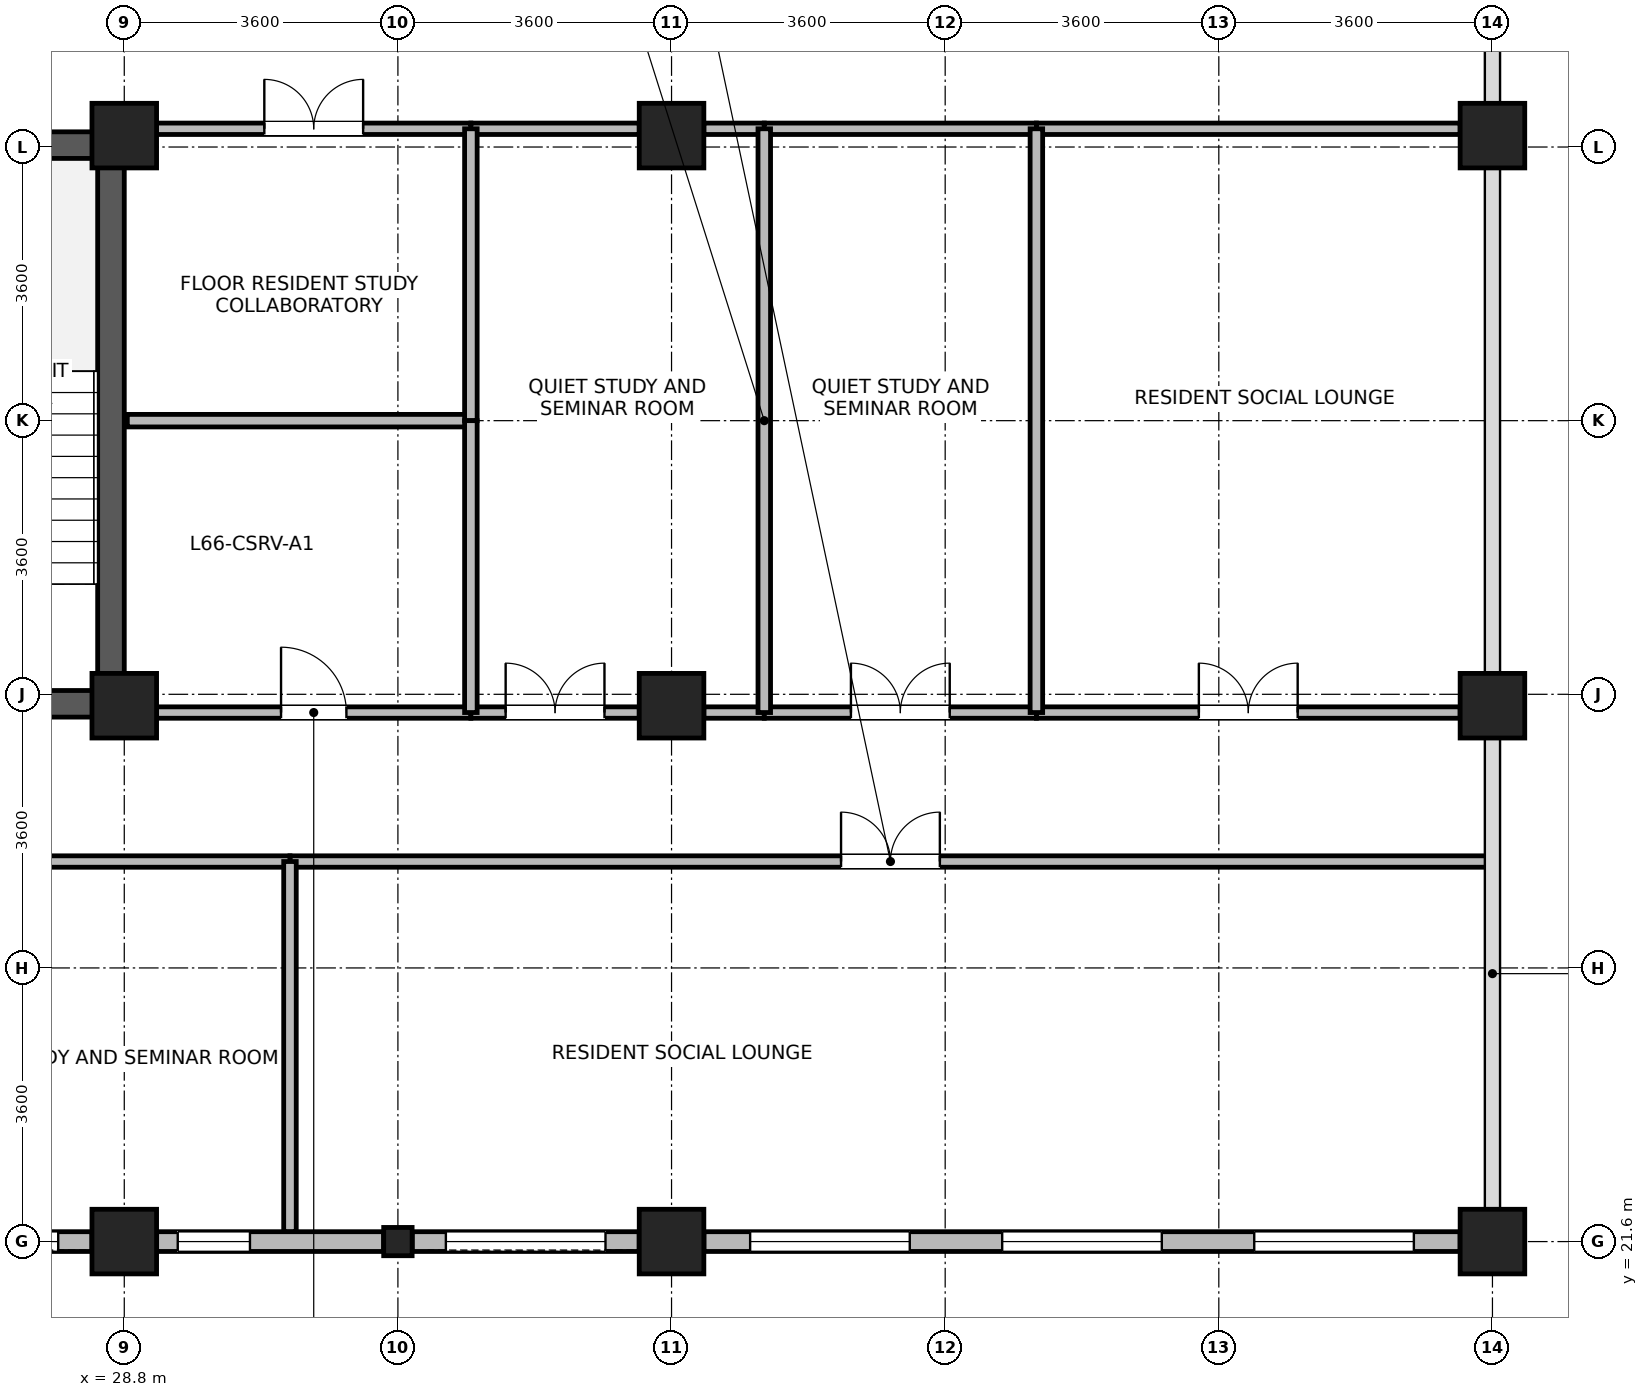
"""IFC4 building model, lengths in metres.
Left out: names, types, materials, properties, quantities, classifications, styles, units other than length and angle.
Written with IfcOpenShell. Run it as: python <this file> out.ifc"""

import sys

from ifc_helpers import new_model, si_unit, direction, frame, frame_2d, origin, origin_2d, place, context, subcontext, project, spatial, rectangle, i_section, extrude, source, transform, mapped, element, fill, save


model = new_model("IFC4")
c1 = context("Model", 3, precision=1e-05, world=origin(), true_north=direction((0.0, 1.0)))
c2 = subcontext(c1, "Body", "Model", "MODEL_VIEW")
j1 = project(units=[si_unit("LENGTHUNIT", "METRE"), si_unit("PLANEANGLEUNIT", "RADIAN")], contexts=[c1])
p1 = place(None, origin())
s1 = spatial("IfcSite", under=j1, at=p1, CompositionType="ELEMENT")
p2 = place(p1, origin())
s2 = spatial("IfcBuilding", under=s1, at=p2, CompositionType="ELEMENT")
p3 = place(p2, frame((0.0, 0.0, 257.3)))
s3 = spatial("IfcBuildingStorey", under=s2, at=p3, CompositionType="ELEMENT", Elevation=257.3)
p4 = place(p3, frame((28.625, 28.5, 0.0), z_axis=(0.0, 0.0, 1.0), x_axis=(0.0, 1.0, 0.0)))
e1 = element("IfcWall", 1, at=p4, inside=s3, PredefinedType="SHEAR", context=c2, shape_type="SweptSolid", body=[
    extrude(rectangle(XDim=7.7, YDim=0.35, at=frame_2d((3.85, 0.0))), origin(), (0.0, 0.0, 1.0), 3.475),
])
for number, where, z_axis, x_axis in (
    (2, (25.25, 28.675, 0.0), (0.0, 0.0, 1.0), (1.0, 0.0, 0.0)),
    (3, (25.25, 36.025, 0.0), (0.0, 0.0, 1.0), (1.0, 0.0, 0.0)),
):
    element("IfcWall", number, at=place(p3, frame(where, z_axis=z_axis, x_axis=x_axis)), inside=s3, PredefinedType="SHEAR", context=c2, shape_type="SweptSolid", body=[
        extrude(rectangle(XDim=3.2, YDim=0.35, at=frame_2d((1.6, 0.0))), origin(), (0.0, 0.0, 1.0), 3.475),
    ])
m1 = source(origin(), c2, "Body", "SweptSolid", [
    extrude(rectangle(XDim=0.85, YDim=0.85, at=origin_2d()), origin(), (0.0, 0.0, 1.0), 3.7),
])
for number, where, z_axis, x_axis in (
    (4, (28.8, 21.6, 0.0), (0.0, 0.0, 1.0), (1.0, 0.0, 0.0)),
    (5, (28.8, 28.65, 0.0), (0.0, 0.0, 1.0), (1.0, 0.0, 0.0)),
    (6, (28.8, 36.15, 0.0), (0.0, 0.0, 1.0), (1.0, 0.0, 0.0)),
    (7, (36.0, 21.6, 0.0), (0.0, 0.0, 1.0), (1.0, 0.0, 0.0)),
    (8, (36.0, 28.65, 0.0), (0.0, 0.0, 1.0), (1.0, 0.0, 0.0)),
    (9, (36.0, 36.15, 0.0), (0.0, 0.0, 1.0), (1.0, 0.0, 0.0)),
    (10, (46.8, 21.6, 0.0), (0.0, 0.0, 1.0), (1.0, 0.0, 0.0)),
    (11, (46.8, 28.65, 0.0), (0.0, 0.0, 1.0), (1.0, 0.0, 0.0)),
    (12, (46.8, 36.15, 0.0), (0.0, 0.0, 1.0), (1.0, 0.0, 0.0)),
):
    element("IfcColumn", number, at=place(p3, frame(where, z_axis=z_axis, x_axis=x_axis)), inside=s3, PredefinedType="COLUMN", context=c2, shape_type="MappedRepresentation", body=[
        mapped(m1, transform((0.0, 0.0, 0.0), x_axis=(1.0, 0.0, 0.0), y_axis=(0.0, 1.0, 0.0), z_axis=(0.0, 0.0, 1.0), scale=1.0)),
    ])
m2 = source(origin(), c2, "Body", "SweptSolid", [
    extrude(i_section(OverallWidth=0.374, OverallDepth=0.372, WebThickness=0.015, FlangeThickness=0.026, FilletRadius=0.015, at=origin_2d()), origin(), (0.0, 0.0, 1.0), 3.7),
])
p5 = place(p3, frame((32.4, 21.6, 0.0), z_axis=(0.0, 0.0, 1.0), x_axis=(1.0, 0.0, 0.0)))
e13 = element("IfcColumn", 13, at=p5, inside=s3, PredefinedType="COLUMN", context=c2, shape_type="MappedRepresentation", body=[
    mapped(m2, transform((0.0, 0.0, 0.0), x_axis=(1.0, 0.0, 0.0), y_axis=(0.0, 1.0, 0.0), z_axis=(0.0, 0.0, 1.0), scale=1.0)),
])
p6 = place(p3, frame((28.374, 21.6, 0.0), z_axis=(0.0, 0.0, 1.0), x_axis=(-1.0, 0.0, 0.0)))
e14 = element("IfcWall", 14, at=p6, inside=s3, PredefinedType="STANDARD", context=c2, shape_type="SweptSolid", body=[
    extrude(rectangle(XDim=2.986, YDim=0.26, at=frame_2d((1.493, 0.0))), origin(), (0.0, 0.0, 1.0), 3.055),
])
p7 = place(p6, frame((0.443, 0.0, 0.85)))
e15 = element("IfcOpeningElement", 15, at=p7, cuts=e14, PredefinedType="OPENING", context=c2, shape_type="SweptSolid", body=[
    extrude(rectangle(XDim=2.1, YDim=1.95, at=frame_2d((1.05, 0.975))), frame((0.0, 0.14, 0.0), z_axis=(0.0, -1.0, 0.0), x_axis=(1.0, 0.0, 0.0)), (0.0, 0.0, 1.0), 0.28),
])
p8 = place(p3, frame((32.212, 21.6, 0.0), z_axis=(0.0, 0.0, 1.0), x_axis=(-1.0, 0.0, 0.0)))
e16 = element("IfcWall", 16, at=p8, inside=s3, PredefinedType="STANDARD", context=c2, shape_type="SweptSolid", body=[
    extrude(rectangle(XDim=2.986, YDim=0.26, at=frame_2d((1.493, 0.0))), origin(), (0.0, 0.0, 1.0), 3.055),
])
p9 = place(p8, frame((1.759, 0.0, 0.85)))
e17 = element("IfcOpeningElement", 17, at=p9, cuts=e16, PredefinedType="OPENING", context=c2, shape_type="SweptSolid", body=[
    extrude(rectangle(XDim=0.95, YDim=1.75, at=frame_2d((0.475, 0.875))), frame((0.0, 0.14, 0.0), z_axis=(0.0, -1.0, 0.0), x_axis=(1.0, 0.0, 0.0)), (0.0, 0.0, 1.0), 0.28),
])
p10 = place(p3, frame((35.574, 21.6, 0.0), z_axis=(0.0, 0.0, 1.0), x_axis=(-1.0, 0.0, 0.0)))
e18 = element("IfcWall", 18, at=p10, inside=s3, PredefinedType="STANDARD", context=c2, shape_type="SweptSolid", body=[
    extrude(rectangle(XDim=2.986, YDim=0.26, at=frame_2d((1.493, 0.0))), origin(), (0.0, 0.0, 1.0), 3.055),
])
p11 = place(p10, frame((0.443, 0.0, 0.85)))
e19 = element("IfcOpeningElement", 19, at=p11, cuts=e18, PredefinedType="OPENING", context=c2, shape_type="SweptSolid", body=[
    extrude(rectangle(XDim=2.1, YDim=1.95, at=frame_2d((1.05, 0.975))), frame((0.0, 0.14, 0.0), z_axis=(0.0, -1.0, 0.0), x_axis=(1.0, 0.0, 0.0)), (0.0, 0.0, 1.0), 0.28),
])
p12 = place(p3, frame((46.374, 21.6, 0.0), z_axis=(0.0, 0.0, 1.0), x_axis=(-1.0, 0.0, 0.0)))
e20 = element("IfcWall", 20, at=p12, inside=s3, PredefinedType="STANDARD", context=c2, shape_type="SweptSolid", body=[
    extrude(rectangle(XDim=9.948, YDim=0.26, at=frame_2d((4.974, 0.0))), origin(), (0.0, 0.0, 1.0), 3.055),
])
p13 = place(p12, frame((0.608, 0.0, 0.85)))
e21 = element("IfcOpeningElement", 21, at=p13, cuts=e20, PredefinedType="OPENING", context=c2, shape_type="SweptSolid", body=[
    extrude(rectangle(XDim=2.1, YDim=1.95, at=frame_2d((1.05, 0.975))), frame((0.0, 0.14, 0.0), z_axis=(0.0, -1.0, 0.0), x_axis=(1.0, 0.0, 0.0)), (0.0, 0.0, 1.0), 0.28),
])
p14 = place(p12, frame((3.924, 0.0, 0.85)))
e22 = element("IfcOpeningElement", 22, at=p14, cuts=e20, PredefinedType="OPENING", context=c2, shape_type="SweptSolid", body=[
    extrude(rectangle(XDim=2.1, YDim=1.95, at=frame_2d((1.05, 0.975))), frame((0.0, 0.14, 0.0), z_axis=(0.0, -1.0, 0.0), x_axis=(1.0, 0.0, 0.0)), (0.0, 0.0, 1.0), 0.28),
])
p15 = place(p12, frame((7.24, 0.0, 0.85)))
e23 = element("IfcOpeningElement", 23, at=p15, cuts=e20, PredefinedType="OPENING", context=c2, shape_type="SweptSolid", body=[
    extrude(rectangle(XDim=2.1, YDim=1.95, at=frame_2d((1.05, 0.975))), frame((0.0, 0.14, 0.0), z_axis=(0.0, -1.0, 0.0), x_axis=(1.0, 0.0, 0.0)), (0.0, 0.0, 1.0), 0.28),
])
p16 = place(p3, frame((30.98, 26.6, 0.0), z_axis=(0.0, 0.0, 1.0), x_axis=(1.0, 0.0, 0.0)))
e24 = element("IfcWall", 24, at=p16, inside=s3, PredefinedType="PARTITIONING", context=c2, shape_type="SweptSolid", body=[
    extrude(rectangle(XDim=15.8, YDim=0.15, at=frame_2d((7.9, 0.0))), origin(), (0.0, 0.0, 1.0), 3.455),
])
p17 = place(p16, frame((7.25, 0.0, 0.0)))
e25 = element("IfcOpeningElement", 25, at=p17, cuts=e24, PredefinedType="OPENING", context=c2, shape_type="SweptSolid", body=[
    extrude(rectangle(XDim=1.3, YDim=2.12, at=frame_2d((0.65, 1.06))), frame((0.0, 0.085, 0.0), z_axis=(0.0, -1.0, 0.0), x_axis=(1.0, 0.0, 0.0)), (0.0, 0.0, 1.0), 0.17),
])
p18 = place(p3, frame((22.66, 26.6, 0.0), z_axis=(0.0, 0.0, 1.0), x_axis=(1.0, 0.0, 0.0)))
e26 = element("IfcWall", 26, at=p18, inside=s3, PredefinedType="PARTITIONING", context=c2, shape_type="SweptSolid", body=[
    extrude(rectangle(XDim=8.32, YDim=0.15, at=frame_2d((4.16, 0.0))), origin(), (0.0, 0.0, 1.0), 3.455),
])
p19 = place(p18, frame((3.51, 0.0, 0.0)))
e27 = element("IfcOpeningElement", 27, at=p19, cuts=e26, PredefinedType="OPENING", context=c2, shape_type="SweptSolid", body=[
    extrude(rectangle(XDim=1.3, YDim=2.12, at=frame_2d((0.65, 1.06))), frame((0.0, 0.085, 0.0), z_axis=(0.0, -1.0, 0.0), x_axis=(1.0, 0.0, 0.0)), (0.0, 0.0, 1.0), 0.17),
])
p20 = place(p3, frame((40.8, 28.56, 0.0), z_axis=(0.0, 0.0, 1.0), x_axis=(1.0, 0.0, 0.0)))
e28 = element("IfcWall", 28, at=p20, inside=s3, PredefinedType="PARTITIONING", context=c2, shape_type="SweptSolid", body=[
    extrude(rectangle(XDim=5.575, YDim=0.15, at=frame_2d((2.788, 0.0))), origin(), (0.0, 0.0, 1.0), 2.905),
])
p21 = place(p20, frame((2.137, 0.0, 0.0)))
e29 = element("IfcOpeningElement", 29, at=p21, cuts=e28, PredefinedType="OPENING", context=c2, shape_type="SweptSolid", body=[
    extrude(rectangle(XDim=1.3, YDim=2.12, at=frame_2d((0.65, 1.06))), frame((0.0, 0.085, 0.0), z_axis=(0.0, -1.0, 0.0), x_axis=(1.0, 0.0, 0.0)), (0.0, 0.0, 1.0), 0.17),
])
p22 = place(p3, frame((40.8, 36.24, 0.0), z_axis=(0.0, 0.0, 1.0), x_axis=(1.0, 0.0, 0.0)))
e30 = element("IfcWall", 30, at=p22, inside=s3, PredefinedType="PARTITIONING", context=c2, shape_type="SweptSolid", body=[
    extrude(rectangle(XDim=5.575, YDim=0.15, at=frame_2d((2.788, 0.0))), origin(), (0.0, 0.0, 1.0), 2.905),
])
p23 = place(p3, frame((29.225, 28.56, 0.0), z_axis=(0.0, 0.0, 1.0), x_axis=(1.0, 0.0, 0.0)))
e31 = element("IfcWall", 31, at=p23, inside=s3, PredefinedType="PARTITIONING", context=c2, shape_type="SweptSolid", body=[
    extrude(rectangle(XDim=4.135, YDim=0.15, at=frame_2d((2.067, 0.0))), origin(), (0.0, 0.0, 1.0), 2.905),
])
p24 = place(p23, frame((1.637, 0.0, 0.0)))
e32 = element("IfcOpeningElement", 32, at=p24, cuts=e31, PredefinedType="OPENING", context=c2, shape_type="SweptSolid", body=[
    extrude(rectangle(XDim=0.86, YDim=2.02, at=frame_2d((0.43, 1.01))), frame((0.0, 0.085, 0.0), z_axis=(0.0, -1.0, 0.0), x_axis=(1.0, 0.0, 0.0)), (0.0, 0.0, 1.0), 0.17),
])
p25 = place(p3, frame((29.225, 36.24, 0.0), z_axis=(0.0, 0.0, 1.0), x_axis=(1.0, 0.0, 0.0)))
e33 = element("IfcWall", 33, at=p25, inside=s3, PredefinedType="PARTITIONING", context=c2, shape_type="SweptSolid", body=[
    extrude(rectangle(XDim=4.135, YDim=0.15, at=frame_2d((2.067, 0.0))), origin(), (0.0, 0.0, 1.0), 2.905),
])
p26 = place(p25, frame((1.417, 0.0, 0.0)))
e34 = element("IfcOpeningElement", 34, at=p26, cuts=e33, PredefinedType="OPENING", context=c2, shape_type="SweptSolid", body=[
    extrude(rectangle(XDim=1.3, YDim=2.12, at=frame_2d((0.65, 1.06))), frame((0.0, 0.085, 0.0), z_axis=(0.0, -1.0, 0.0), x_axis=(1.0, 0.0, 0.0)), (0.0, 0.0, 1.0), 0.17),
])
p27 = place(p3, frame((33.36, 28.56, 0.0), z_axis=(0.0, 0.0, 1.0), x_axis=(1.0, 0.0, 0.0)))
e35 = element("IfcWall", 35, at=p27, inside=s3, PredefinedType="PARTITIONING", context=c2, shape_type="SweptSolid", body=[
    extrude(rectangle(XDim=2.215, YDim=0.15, at=frame_2d((1.107, 0.0))), origin(), (0.0, 0.0, 1.0), 2.905),
])
p28 = place(p27, frame((0.458, 0.0, 0.0)))
e36 = element("IfcOpeningElement", 36, at=p28, cuts=e35, PredefinedType="OPENING", context=c2, shape_type="SweptSolid", body=[
    extrude(rectangle(XDim=1.3, YDim=2.12, at=frame_2d((0.65, 1.06))), frame((0.0, 0.085, 0.0), z_axis=(0.0, -1.0, 0.0), x_axis=(1.0, 0.0, 0.0)), (0.0, 0.0, 1.0), 0.17),
])
p29 = place(p3, frame((36.425, 28.56, 0.0), z_axis=(0.0, 0.0, 1.0), x_axis=(1.0, 0.0, 0.0)))
e37 = element("IfcWall", 37, at=p29, inside=s3, PredefinedType="PARTITIONING", context=c2, shape_type="SweptSolid", body=[
    extrude(rectangle(XDim=0.795, YDim=0.15, at=frame_2d((0.397, 0.0))), origin(), (0.0, 0.0, 1.0), 2.905),
])
p30 = place(p3, frame((33.36, 36.24, 0.0), z_axis=(0.0, 0.0, 1.0), x_axis=(1.0, 0.0, 0.0)))
e38 = element("IfcWall", 38, at=p30, inside=s3, PredefinedType="PARTITIONING", context=c2, shape_type="SweptSolid", body=[
    extrude(rectangle(XDim=2.215, YDim=0.15, at=frame_2d((1.107, 0.0))), origin(), (0.0, 0.0, 1.0), 2.905),
])
p31 = place(p3, frame((36.425, 36.24, 0.0), z_axis=(0.0, 0.0, 1.0), x_axis=(1.0, 0.0, 0.0)))
e39 = element("IfcWall", 39, at=p31, inside=s3, PredefinedType="PARTITIONING", context=c2, shape_type="SweptSolid", body=[
    extrude(rectangle(XDim=0.795, YDim=0.15, at=frame_2d((0.397, 0.0))), origin(), (0.0, 0.0, 1.0), 2.905),
])
p32 = place(p3, frame((37.22, 28.56, 0.0), z_axis=(0.0, 0.0, 1.0), x_axis=(1.0, 0.0, 0.0)))
e40 = element("IfcWall", 40, at=p32, inside=s3, PredefinedType="PARTITIONING", context=c2, shape_type="SweptSolid", body=[
    extrude(rectangle(XDim=3.58, YDim=0.15, at=frame_2d((1.79, 0.0))), origin(), (0.0, 0.0, 1.0), 2.905),
])
p33 = place(p32, frame((1.14, 0.0, 0.0)))
e41 = element("IfcOpeningElement", 41, at=p33, cuts=e40, PredefinedType="OPENING", context=c2, shape_type="SweptSolid", body=[
    extrude(rectangle(XDim=1.3, YDim=2.12, at=frame_2d((0.65, 1.06))), frame((0.0, 0.085, 0.0), z_axis=(0.0, -1.0, 0.0), x_axis=(1.0, 0.0, 0.0)), (0.0, 0.0, 1.0), 0.17),
])
p34 = place(p3, frame((37.22, 36.24, 0.0), z_axis=(0.0, 0.0, 1.0), x_axis=(1.0, 0.0, 0.0)))
e42 = element("IfcWall", 42, at=p34, inside=s3, PredefinedType="PARTITIONING", context=c2, shape_type="SweptSolid", body=[
    extrude(rectangle(XDim=3.58, YDim=0.15, at=frame_2d((1.79, 0.0))), origin(), (0.0, 0.0, 1.0), 2.905),
])
for number, where, z_axis, x_axis in (
    (43, (37.22, 28.56, 0.0), (0.0, 0.0, 1.0), (0.0, 1.0, 0.0)),
    (44, (40.8, 28.56, 0.0), (0.0, 0.0, 1.0), (0.0, 1.0, 0.0)),
):
    element("IfcWall", number, at=place(p3, frame(where, z_axis=z_axis, x_axis=x_axis)), inside=s3, PredefinedType="PARTITIONING", context=c2, shape_type="SweptSolid", body=[
        extrude(rectangle(XDim=7.68, YDim=0.165, at=frame_2d((3.84, 0.0))), origin(), (0.0, 0.0, 1.0), 3.455),
    ])
p35 = place(p3, frame((30.98, 21.732, 0.0), z_axis=(0.0, 0.0, 1.0), x_axis=(0.0, 1.0, 0.0)))
e45 = element("IfcWall", 45, at=p35, inside=s3, PredefinedType="PARTITIONING", context=c2, shape_type="SweptSolid", body=[
    extrude(rectangle(XDim=4.868, YDim=0.165, at=frame_2d((2.434, 0.0))), origin(), (0.0, 0.0, 1.0), 3.455),
])
p36 = place(p3, frame((28.84, 32.4, 0.0), z_axis=(0.0, 0.0, 1.0), x_axis=(1.0, 0.0, 0.0)))
e46 = element("IfcWall", 46, at=p36, inside=s3, PredefinedType="PARTITIONING", context=c2, shape_type="SweptSolid", body=[
    extrude(rectangle(XDim=4.52, YDim=0.165, at=frame_2d((2.26, 0.0))), origin(), (0.0, 0.0, 1.0), 3.455),
])
p37 = place(p3, frame((33.36, 32.4, 0.0), z_axis=(0.0, 0.0, 1.0), x_axis=(0.0, 1.0, 0.0)))
e47 = element("IfcWall", 47, at=p37, inside=s3, PredefinedType="PARTITIONING", context=c2, shape_type="SweptSolid", body=[
    extrude(rectangle(XDim=3.84, YDim=0.165, at=frame_2d((1.92, 0.0))), origin(), (0.0, 0.0, 1.0), 3.455),
])
p38 = place(p3, frame((33.36, 28.56, 0.0), z_axis=(0.0, 0.0, 1.0), x_axis=(0.0, 1.0, 0.0)))
e48 = element("IfcWall", 48, at=p38, inside=s3, PredefinedType="PARTITIONING", context=c2, shape_type="SweptSolid", body=[
    extrude(rectangle(XDim=3.84, YDim=0.165, at=frame_2d((1.92, 0.0))), origin(), (0.0, 0.0, 1.0), 3.455),
])
p39 = place(p7, origin())
e49 = element("IfcWindow", 49, at=p39, inside=s3, PartitioningType="SINGLE_PANEL", PredefinedType="WINDOW", context=c2, shape_type="SweptSolid", body=[
    extrude(rectangle(XDim=2.1, YDim=1.95, at=frame_2d((1.05, 0.975))), frame((0.0, 0.03, 0.0), z_axis=(0.0, -1.0, 0.0), x_axis=(1.0, 0.0, 0.0)), (0.0, 0.0, 1.0), 0.06),
])
fill(e15, e49)
p40 = place(p9, origin())
e50 = element("IfcWindow", 50, at=p40, inside=s3, PartitioningType="SINGLE_PANEL", PredefinedType="WINDOW", context=c2, shape_type="SweptSolid", body=[
    extrude(rectangle(XDim=0.95, YDim=1.75, at=frame_2d((0.475, 0.875))), frame((0.0, 0.03, 0.0), z_axis=(0.0, -1.0, 0.0), x_axis=(1.0, 0.0, 0.0)), (0.0, 0.0, 1.0), 0.06),
])
fill(e17, e50)
p41 = place(p11, origin())
e51 = element("IfcWindow", 51, at=p41, inside=s3, PartitioningType="SINGLE_PANEL", PredefinedType="WINDOW", context=c2, shape_type="SweptSolid", body=[
    extrude(rectangle(XDim=2.1, YDim=1.95, at=frame_2d((1.05, 0.975))), frame((0.0, 0.03, 0.0), z_axis=(0.0, -1.0, 0.0), x_axis=(1.0, 0.0, 0.0)), (0.0, 0.0, 1.0), 0.06),
])
fill(e19, e51)
p42 = place(p13, origin())
e52 = element("IfcWindow", 52, at=p42, inside=s3, PartitioningType="SINGLE_PANEL", PredefinedType="WINDOW", context=c2, shape_type="SweptSolid", body=[
    extrude(rectangle(XDim=2.1, YDim=1.95, at=frame_2d((1.05, 0.975))), frame((0.0, 0.03, 0.0), z_axis=(0.0, -1.0, 0.0), x_axis=(1.0, 0.0, 0.0)), (0.0, 0.0, 1.0), 0.06),
])
fill(e21, e52)
p43 = place(p14, origin())
e53 = element("IfcWindow", 53, at=p43, inside=s3, PartitioningType="SINGLE_PANEL", PredefinedType="WINDOW", context=c2, shape_type="SweptSolid", body=[
    extrude(rectangle(XDim=2.1, YDim=1.95, at=frame_2d((1.05, 0.975))), frame((0.0, 0.03, 0.0), z_axis=(0.0, -1.0, 0.0), x_axis=(1.0, 0.0, 0.0)), (0.0, 0.0, 1.0), 0.06),
])
fill(e22, e53)
p44 = place(p15, origin())
e54 = element("IfcWindow", 54, at=p44, inside=s3, PartitioningType="SINGLE_PANEL", PredefinedType="WINDOW", context=c2, shape_type="SweptSolid", body=[
    extrude(rectangle(XDim=2.1, YDim=1.95, at=frame_2d((1.05, 0.975))), frame((0.0, 0.03, 0.0), z_axis=(0.0, -1.0, 0.0), x_axis=(1.0, 0.0, 0.0)), (0.0, 0.0, 1.0), 0.06),
])
fill(e23, e54)
p45 = place(p17, origin())
e55 = element("IfcDoor", 55, at=p45, inside=s3, OperationType="DOUBLE_DOOR_SINGLE_SWING", PredefinedType="DOOR", context=c2, shape_type="SweptSolid", body=[
    extrude(rectangle(XDim=1.3, YDim=2.12, at=frame_2d((0.65, 1.06))), frame((0.0, 0.025, 0.0), z_axis=(0.0, -1.0, 0.0), x_axis=(1.0, 0.0, 0.0)), (0.0, 0.0, 1.0), 0.05),
])
fill(e25, e55)
p46 = place(p21, origin())
e56 = element("IfcDoor", 56, at=p46, inside=s3, OperationType="DOUBLE_DOOR_SINGLE_SWING", PredefinedType="DOOR", context=c2, shape_type="SweptSolid", body=[
    extrude(rectangle(XDim=1.3, YDim=2.12, at=frame_2d((0.65, 1.06))), frame((0.0, 0.025, 0.0), z_axis=(0.0, -1.0, 0.0), x_axis=(1.0, 0.0, 0.0)), (0.0, 0.0, 1.0), 0.05),
])
fill(e29, e56)
p47 = place(p24, origin())
e57 = element("IfcDoor", 57, at=p47, inside=s3, OperationType="SINGLE_SWING_LEFT", PredefinedType="DOOR", context=c2, shape_type="SweptSolid", body=[
    extrude(rectangle(XDim=0.86, YDim=2.02, at=frame_2d((0.43, 1.01))), frame((0.0, 0.025, 0.0), z_axis=(0.0, -1.0, 0.0), x_axis=(1.0, 0.0, 0.0)), (0.0, 0.0, 1.0), 0.05),
])
fill(e32, e57)
p48 = place(p26, origin())
e58 = element("IfcDoor", 58, at=p48, inside=s3, OperationType="DOUBLE_DOOR_SINGLE_SWING", PredefinedType="DOOR", context=c2, shape_type="SweptSolid", body=[
    extrude(rectangle(XDim=1.3, YDim=2.12, at=frame_2d((0.65, 1.06))), frame((0.0, 0.025, 0.0), z_axis=(0.0, -1.0, 0.0), x_axis=(1.0, 0.0, 0.0)), (0.0, 0.0, 1.0), 0.05),
])
fill(e34, e58)
p49 = place(p28, origin())
e59 = element("IfcDoor", 59, at=p49, inside=s3, OperationType="DOUBLE_DOOR_SINGLE_SWING", PredefinedType="DOOR", context=c2, shape_type="SweptSolid", body=[
    extrude(rectangle(XDim=1.3, YDim=2.12, at=frame_2d((0.65, 1.06))), frame((0.0, 0.025, 0.0), z_axis=(0.0, -1.0, 0.0), x_axis=(1.0, 0.0, 0.0)), (0.0, 0.0, 1.0), 0.05),
])
fill(e36, e59)
p50 = place(p33, origin())
e60 = element("IfcDoor", 60, at=p50, inside=s3, OperationType="DOUBLE_DOOR_SINGLE_SWING", PredefinedType="DOOR", context=c2, shape_type="SweptSolid", body=[
    extrude(rectangle(XDim=1.3, YDim=2.12, at=frame_2d((0.65, 1.06))), frame((0.0, 0.025, 0.0), z_axis=(0.0, -1.0, 0.0), x_axis=(1.0, 0.0, 0.0)), (0.0, 0.0, 1.0), 0.05),
])
fill(e41, e60)
save(model, sys.argv[1])
